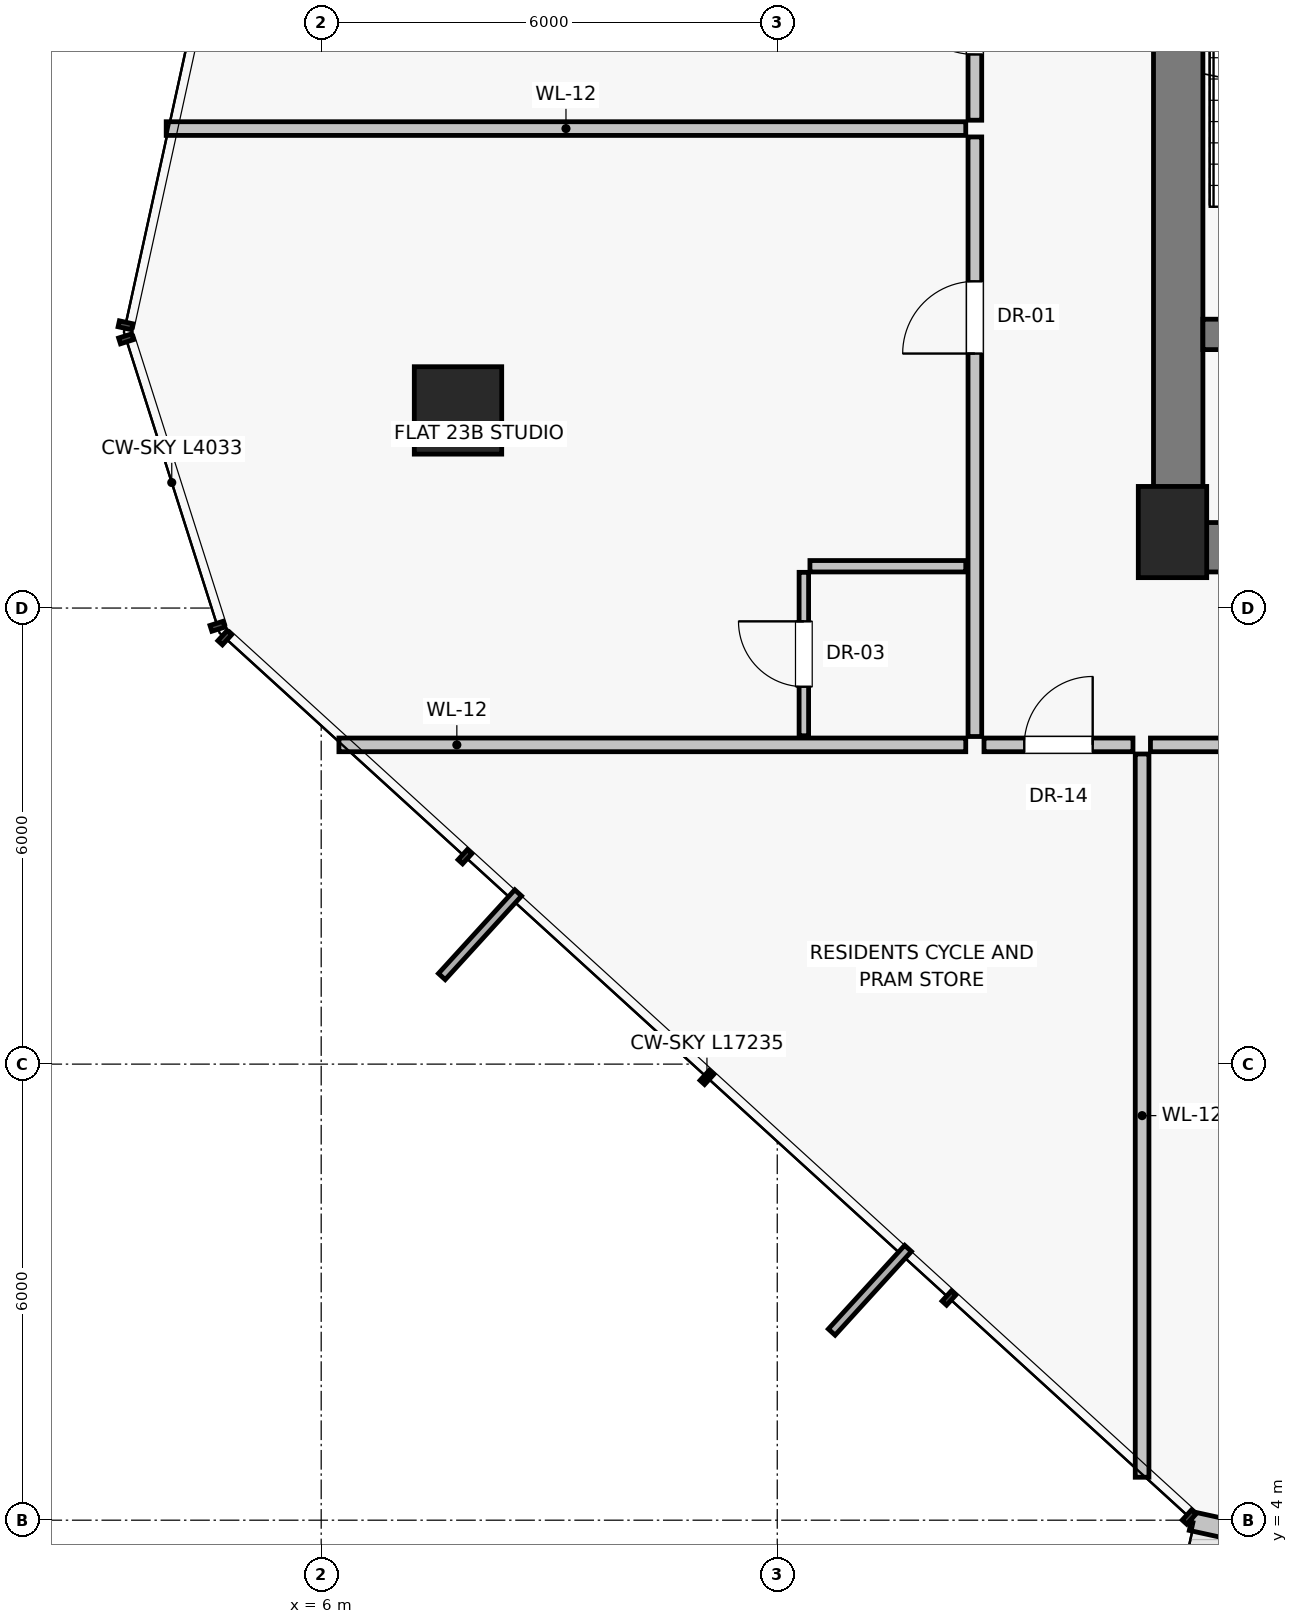
"""IFC4 building model, lengths in metres.
Left out: names, types, materials, properties, quantities, classifications, styles, units other than length and angle.
Written with IfcOpenShell. Run it as: python <this file> out.ifc"""

import sys

from ifc_helpers import new_model, si_unit, direction, frame, frame_2d, origin, origin_2d, place, context, subcontext, project, spatial, rectangle, extrude, source, transform, mapped, element, fill, save


model = new_model("IFC4")
c1 = context("Model", 3, precision=1e-05, world=origin(), true_north=direction((0.0, 1.0)))
c2 = subcontext(c1, "Body", "Model", "MODEL_VIEW")
j1 = project(units=[si_unit("LENGTHUNIT", "METRE"), si_unit("PLANEANGLEUNIT", "RADIAN")], contexts=[c1])
p1 = place(None, origin())
s1 = spatial("IfcSite", under=j1, at=p1, CompositionType="ELEMENT")
p2 = place(p1, origin())
s2 = spatial("IfcBuilding", under=s1, at=p2, CompositionType="ELEMENT")
p3 = place(p2, frame((0.0, 0.0, 85.15)))
s3 = spatial("IfcBuildingStorey", under=s2, at=p3, CompositionType="ELEMENT", Elevation=85.15)
p4 = place(p3, frame((17.2, 17.0, 0.0), z_axis=(0.0, 0.0, 1.0), x_axis=(1.0, 0.0, 0.0)))
e1 = element("IfcColumn", 1, at=p4, inside=s3, PredefinedType="PILASTER", context=c2, shape_type="SweptSolid", body=[
    extrude(rectangle(XDim=0.9, YDim=1.2, at=origin_2d()), origin(), (0.0, 0.0, 1.0), 4.3),
])
p5 = place(p3, frame((7.8, 18.6, -0.32), z_axis=(0.0, 0.0, 1.0), x_axis=(1.0, 0.0, 0.0)))
e2 = element("IfcColumn", 2, at=p5, inside=s3, PredefinedType="COLUMN", context=c2, shape_type="SweptSolid", body=[
    extrude(rectangle(XDim=1.15, YDim=1.15, at=origin_2d()), origin(), (0.0, 0.0, 1.0), 4.62),
])
p6 = place(p3, frame((17.448, 3.988, 0.0), z_axis=(0.0, 0.0, 1.0), x_axis=(0.976817927987, -0.214071800017, 0.0)))
e3 = element("IfcWall", 3, at=p6, inside=s3, PredefinedType="SOLIDWALL", context=c2, shape_type="SweptSolid", body=[
    extrude(rectangle(XDim=4.233, YDim=0.25, at=frame_2d((2.117, 0.0))), origin(), (0.0, 0.0, 1.0), 4.05),
])
p7 = place(p6, frame((0.73, 0.0, 0.0)))
e4 = element("IfcOpeningElement", 4, at=p7, cuts=e3, PredefinedType="OPENING", context=c2, shape_type="SweptSolid", body=[
    extrude(rectangle(XDim=1.15, YDim=2.25, at=frame_2d((0.575, 1.125))), frame((0.0, 0.135, 0.0), z_axis=(0.0, -1.0, 0.0), x_axis=(1.0, 0.0, 0.0)), (0.0, 0.0, 1.0), 0.27),
])
p8 = place(p6, frame((2.13, 0.0, 0.8)))
e5 = element("IfcOpeningElement", 5, at=p8, cuts=e3, PredefinedType="OPENING", context=c2, shape_type="SweptSolid", body=[
    extrude(rectangle(XDim=1.35, YDim=1.55, at=frame_2d((0.675, 0.775))), frame((0.0, 0.135, 0.0), z_axis=(0.0, -1.0, 0.0), x_axis=(1.0, 0.0, 0.0)), (0.0, 0.0, 1.0), 0.27),
])
p9 = place(p3, frame((17.275, 16.8, 0.0), z_axis=(0.0, 0.0, 1.0), x_axis=(0.0, 1.0, 0.0)))
e6 = element("IfcWall", 6, at=p9, inside=s3, PredefinedType="SHEAR", context=c2, shape_type="SweptSolid", body=[
    extrude(rectangle(XDim=14.2, YDim=0.65, at=frame_2d((7.1, 0.0))), origin(), (0.0, 0.0, 1.0), 4.05),
])
p10 = place(p3, frame((17.2, 16.8, 0.0), z_axis=(0.0, 0.0, 1.0), x_axis=(1.0, 0.0, 0.0)))
e7 = element("IfcWall", 7, at=p10, inside=s3, PredefinedType="SHEAR", context=c2, shape_type="SweptSolid", body=[
    extrude(rectangle(XDim=5.85, YDim=0.65, at=frame_2d((2.925, 0.0))), origin(), (0.0, 0.0, 1.0), 4.05),
])
p11 = place(p10, frame((1.15, 0.0, 0.0)))
e8 = element("IfcOpeningElement", 8, at=p11, cuts=e7, PredefinedType="OPENING", context=c2, shape_type="SweptSolid", body=[
    extrude(rectangle(XDim=1.2, YDim=2.03, at=frame_2d((0.6, 1.015))), frame((0.0, 0.335, 0.0), z_axis=(0.0, -1.0, 0.0), x_axis=(1.0, 0.0, 0.0)), (0.0, 0.0, 1.0), 0.67),
])
p12 = place(p3, frame((17.6, 19.6, 0.0), z_axis=(0.0, 0.0, 1.0), x_axis=(1.0, 0.0, 0.0)))
e9 = element("IfcWall", 9, at=p12, inside=s3, PredefinedType="SHEAR", context=c2, shape_type="SweptSolid", body=[
    extrude(rectangle(XDim=3.4, YDim=0.4, at=frame_2d((1.7, 0.0))), origin(), (0.0, 0.0, 1.0), 4.05),
])
p13 = place(p12, frame((1.05, 0.0, 0.0)))
e10 = element("IfcOpeningElement", 10, at=p13, cuts=e9, PredefinedType="OPENING", context=c2, shape_type="SweptSolid", body=[
    extrude(rectangle(XDim=1.1, YDim=2.03, at=frame_2d((0.55, 1.015))), frame((0.0, 0.21, 0.0), z_axis=(0.0, -1.0, 0.0), x_axis=(1.0, 0.0, 0.0)), (0.0, 0.0, 1.0), 0.42),
])
p14 = place(p3, frame((16.8, 14.08, 0.0), z_axis=(0.0, 0.0, 1.0), x_axis=(0.0, -1.0, 0.0)))
e11 = element("IfcWall", 11, at=p14, inside=s3, PredefinedType="PARTITIONING", context=c2, shape_type="SweptSolid", body=[
    extrude(rectangle(XDim=9.515, YDim=0.18, at=frame_2d((4.758, 0.0))), origin(), (0.0, 0.0, 1.0), 4.05),
])
p15 = place(p3, frame((16.91, 14.2, 0.0), z_axis=(0.0, 0.0, 1.0), x_axis=(1.0, 0.0, 0.0)))
e12 = element("IfcWall", 12, at=p15, inside=s3, PredefinedType="PARTITIONING", context=c2, shape_type="SweptSolid", body=[
    extrude(rectangle(XDim=7.988, YDim=0.18, at=frame_2d((3.994, 0.0))), origin(), (0.0, 0.0, 1.0), 4.05),
])
p16 = place(p15, frame((3.094, 0.0, 0.0)))
e13 = element("IfcOpeningElement", 13, at=p16, cuts=e12, PredefinedType="OPENING", context=c2, shape_type="SweptSolid", body=[
    extrude(rectangle(XDim=1.8, YDim=2.25, at=frame_2d((0.9, 1.125))), frame((0.0, 0.1, 0.0), z_axis=(0.0, -1.0, 0.0), x_axis=(1.0, 0.0, 0.0)), (0.0, 0.0, 1.0), 0.2),
])
p17 = place(p3, frame((14.48, 14.2, 0.0), z_axis=(0.0, 0.0, 1.0), x_axis=(-1.0, 0.0, 0.0)))
e14 = element("IfcWall", 14, at=p17, inside=s3, PredefinedType="PARTITIONING", context=c2, shape_type="SweptSolid", body=[
    extrude(rectangle(XDim=8.247, YDim=0.18, at=frame_2d((4.123, 0.0))), origin(), (0.0, 0.0, 1.0), 4.05),
])
p18 = place(p3, frame((14.6, 22.418, 0.0), z_axis=(0.0, 0.0, 1.0), x_axis=(0.0, 1.0, 0.0)))
e15 = element("IfcWall", 15, at=p18, inside=s3, PredefinedType="PARTITIONING", context=c2, shape_type="SweptSolid", body=[
    extrude(rectangle(XDim=2.73, YDim=0.18, at=frame_2d((1.365, 0.0))), origin(), (0.0, 0.0, 1.0), 4.05),
])
p19 = place(p18, frame((0.865, 0.0, 0.0)))
e16 = element("IfcOpeningElement", 16, at=p19, cuts=e15, PredefinedType="OPENING", context=c2, shape_type="SweptSolid", body=[
    extrude(rectangle(XDim=1.0, YDim=2.01, at=frame_2d((0.5, 1.005))), frame((0.0, 0.1, 0.0), z_axis=(0.0, -1.0, 0.0), x_axis=(1.0, 0.0, 0.0)), (0.0, 0.0, 1.0), 0.2),
])
p20 = place(p3, frame((14.48, 22.308, 0.0), z_axis=(0.0, 0.0, 1.0), x_axis=(-1.0, 0.0, 0.0)))
e17 = element("IfcWall", 17, at=p20, inside=s3, PredefinedType="PARTITIONING", context=c2, shape_type="SweptSolid", body=[
    extrude(rectangle(XDim=10.519, YDim=0.18, at=frame_2d((5.26, 0.0))), origin(), (0.0, 0.0, 1.0), 4.05),
])
p21 = place(p3, frame((14.6, 14.31, 0.0), z_axis=(0.0, 0.0, 1.0), x_axis=(0.0, 1.0, 0.0)))
e18 = element("IfcWall", 18, at=p21, inside=s3, PredefinedType="PARTITIONING", context=c2, shape_type="SweptSolid", body=[
    extrude(rectangle(XDim=7.888, YDim=0.18, at=frame_2d((3.944, 0.0))), origin(), (0.0, 0.0, 1.0), 4.05),
])
p22 = place(p21, frame((5.038, 0.0, 0.0)))
e19 = element("IfcOpeningElement", 19, at=p22, cuts=e18, PredefinedType="OPENING", context=c2, shape_type="SweptSolid", body=[
    extrude(rectangle(XDim=0.95, YDim=2.02, at=frame_2d((0.475, 1.01))), frame((0.0, 0.1, 0.0), z_axis=(0.0, -1.0, 0.0), x_axis=(1.0, 0.0, 0.0)), (0.0, 0.0, 1.0), 0.2),
])
p23 = place(p3, frame((14.48, 16.55, 0.0), z_axis=(0.0, 0.0, 1.0), x_axis=(-1.0, 0.0, 0.0)))
e20 = element("IfcWall", 20, at=p23, inside=s3, PredefinedType="PARTITIONING", context=c2, shape_type="SweptSolid", body=[
    extrude(rectangle(XDim=2.05, YDim=0.15, at=frame_2d((1.025, 0.0))), origin(), (0.0, 0.0, 1.0), 4.05),
])
p24 = place(p3, frame((12.35, 14.32, 0.0), z_axis=(0.0, 0.0, 1.0), x_axis=(0.0, 1.0, 0.0)))
e21 = element("IfcWall", 21, at=p24, inside=s3, PredefinedType="PARTITIONING", context=c2, shape_type="SweptSolid", body=[
    extrude(rectangle(XDim=2.15, YDim=0.125, at=frame_2d((1.075, 0.0))), origin(), (0.0, 0.0, 1.0), 4.05),
])
p25 = place(p24, frame((0.645, 0.0, 0.0)))
e22 = element("IfcOpeningElement", 22, at=p25, cuts=e21, PredefinedType="OPENING", context=c2, shape_type="SweptSolid", body=[
    extrude(rectangle(XDim=0.86, YDim=2.01, at=frame_2d((0.43, 1.005))), frame((0.0, 0.073, 0.0), z_axis=(0.0, -1.0, 0.0), x_axis=(1.0, 0.0, 0.0)), (0.0, 0.0, 1.0), 0.145),
])
p26 = place(p3, frame((14.72, 14.2, 0.0), z_axis=(0.0, 0.0, 1.0), x_axis=(1.0, 0.0, 0.0)))
e23 = element("IfcWall", 23, at=p26, inside=s3, PredefinedType="PARTITIONING", context=c2, shape_type="SweptSolid", body=[
    extrude(rectangle(XDim=1.96, YDim=0.18, at=frame_2d((0.98, 0.0))), origin(), (0.0, 0.0, 1.0), 4.05),
])
p27 = place(p26, frame((0.53, 0.0, 0.0)))
e24 = element("IfcOpeningElement", 24, at=p27, cuts=e23, PredefinedType="OPENING", context=c2, shape_type="SweptSolid", body=[
    extrude(rectangle(XDim=0.9, YDim=2.01, at=frame_2d((0.45, 1.005))), frame((0.0, 0.1, 0.0), z_axis=(0.0, -1.0, 0.0), x_axis=(1.0, 0.0, 0.0)), (0.0, 0.0, 1.0), 0.2),
])
m1 = source(origin(), c2, "Body", "SweptSolid", [
    extrude(rectangle(XDim=1.0, YDim=2.01, at=frame_2d((0.5, 1.005))), frame((0.0, 0.025, 0.0), z_axis=(0.0, -1.0, 0.0), x_axis=(1.0, 0.0, 0.0)), (0.0, 0.0, 1.0), 0.05),
])
p28 = place(p19, origin())
e25 = element("IfcDoor", 25, at=p28, inside=s3, OperationType="SINGLE_SWING_RIGHT", PredefinedType="DOOR", context=c2, shape_type="MappedRepresentation", body=[
    mapped(m1, transform((0.0, 0.0, 0.0), scale=1.0)),
])
fill(e16, e25)
m2 = source(origin(), c2, "Body", "SweptSolid", [
    extrude(rectangle(XDim=0.95, YDim=2.02, at=frame_2d((0.475, 1.01))), frame((0.0, 0.025, 0.0), z_axis=(0.0, -1.0, 0.0), x_axis=(1.0, 0.0, 0.0)), (0.0, 0.0, 1.0), 0.05),
])
p29 = place(p22, origin())
e26 = element("IfcDoor", 26, at=p29, inside=s3, OperationType="SINGLE_SWING_LEFT", PredefinedType="DOOR", context=c2, shape_type="MappedRepresentation", body=[
    mapped(m2, transform((0.0, 0.0, 0.0), scale=1.0)),
])
fill(e19, e26)
m3 = source(origin(), c2, "Body", "SweptSolid", [
    extrude(rectangle(XDim=0.86, YDim=2.01, at=frame_2d((0.43, 1.005))), frame((0.0, 0.025, 0.0), z_axis=(0.0, -1.0, 0.0), x_axis=(1.0, 0.0, 0.0)), (0.0, 0.0, 1.0), 0.05),
])
p30 = place(p25, origin())
e27 = element("IfcDoor", 27, at=p30, inside=s3, OperationType="SINGLE_SWING_RIGHT", PredefinedType="DOOR", context=c2, shape_type="MappedRepresentation", body=[
    mapped(m3, transform((0.0, 0.0, 0.0), scale=1.0)),
])
fill(e22, e27)
m4 = source(origin(), c2, "Body", "SweptSolid", [
    extrude(rectangle(XDim=0.9, YDim=2.01, at=frame_2d((0.45, 1.005))), frame((0.0, 0.025, 0.0), z_axis=(0.0, -1.0, 0.0), x_axis=(1.0, 0.0, 0.0)), (0.0, 0.0, 1.0), 0.05),
])
p31 = place(p27, origin())
e28 = element("IfcDoor", 28, at=p31, inside=s3, OperationType="SINGLE_SWING_RIGHT", PredefinedType="DOOR", context=c2, shape_type="MappedRepresentation", body=[
    mapped(m4, transform((0.0, 0.0, 0.0), scale=1.0)),
])
fill(e24, e28)
save(model, sys.argv[1])
